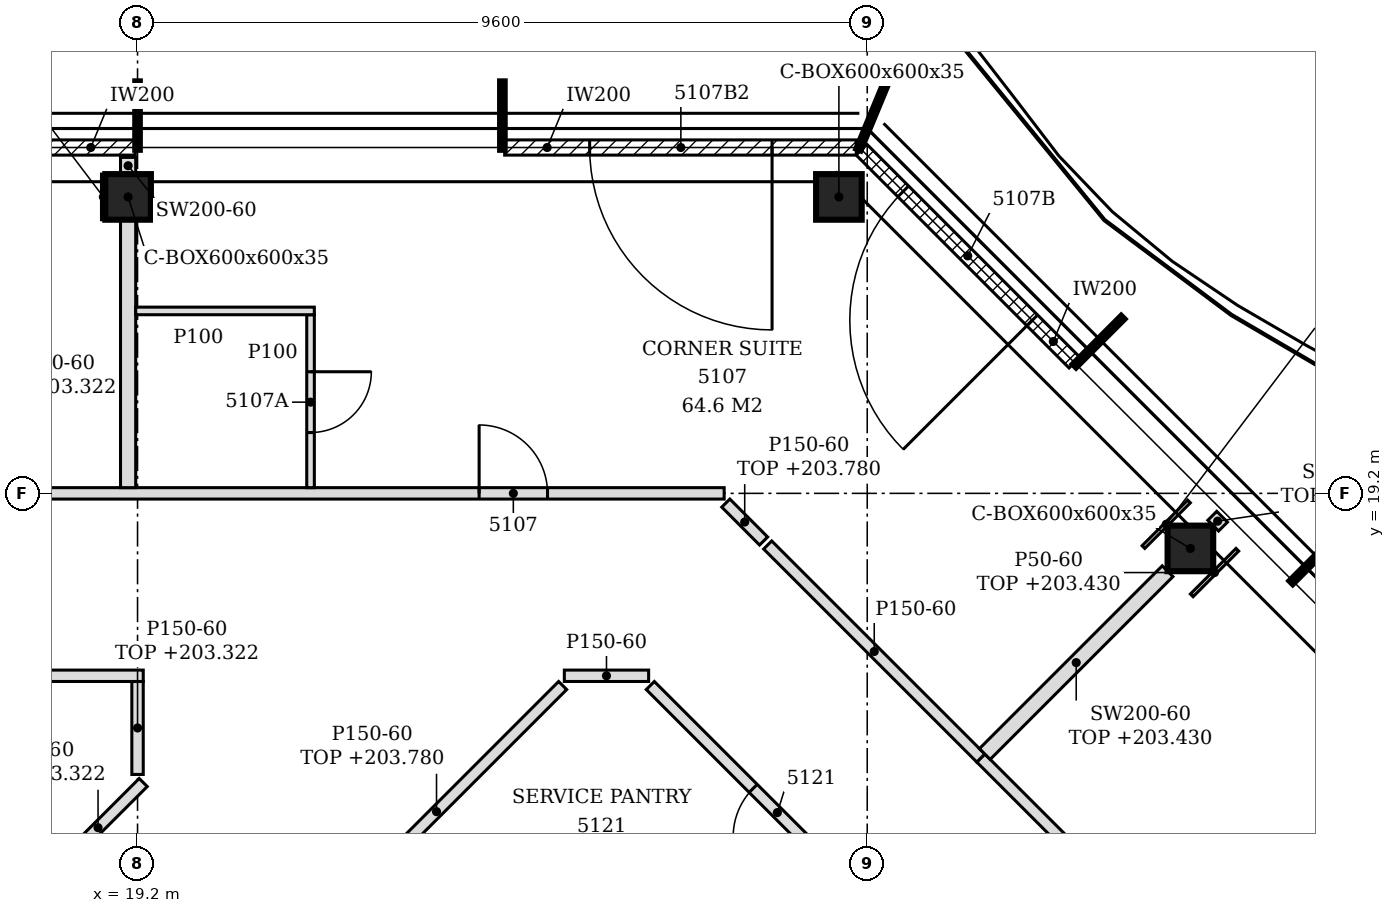
"""IFC4 building model, lengths in metres.
Left out: names, types, materials, properties, quantities, classifications, styles, units other than length and angle.
Written with IfcOpenShell. Run it as: python <this file> out.ifc"""

import sys

from ifc_helpers import new_model, si_unit, direction, frame, frame_2d, origin, origin_2d, place, context, subcontext, project, spatial, polyline, rectangle, hollow_rectangle, outline, extrude, clip, halfspace, element, fill, save


model = new_model("IFC4")
c1 = context("Model", 3, precision=1e-05, world=origin(), true_north=direction((0.0, 1.0)))
c2 = subcontext(c1, "Body", "Model", "MODEL_VIEW")
j1 = project(units=[si_unit("LENGTHUNIT", "METRE"), si_unit("PLANEANGLEUNIT", "RADIAN")], contexts=[c1])
p1 = place(None, origin())
s1 = spatial("IfcSite", under=j1, at=p1, CompositionType="ELEMENT")
p2 = place(p1, origin())
s2 = spatial("IfcBuilding", under=s1, at=p2, CompositionType="ELEMENT")
p3 = place(p2, frame((0.0, 0.0, 201.0)))
s3 = spatial("IfcBuildingStorey", under=s2, at=p3, CompositionType="ELEMENT", Elevation=201.0)
for number, where, z_axis, x_axis in (
    (1, (33.052, 18.476, -0.15), (0.0, 0.0, 1.0), (1.0, 0.0, 0.0)),
    (2, (28.427, 23.1, -0.15), (0.0, 0.0, 1.0), (1.0, 0.0, 0.0)),
    (3, (19.076, 23.1, -0.15), (0.0, 0.0, 1.0), (1.0, 0.0, 0.0)),
):
    element("IfcColumn", number, at=place(p3, frame(where, z_axis=z_axis, x_axis=x_axis)), inside=s3, PredefinedType="COLUMN", context=c2, shape_type="Clipping", body=[
        clip(clip(extrude(hollow_rectangle(XDim=0.6, YDim=0.6, WallThickness=0.035, at=origin_2d()), origin(), (0.0, 0.0, 1.0), 3.5), halfspace(frame((0.0, 0.0, 0.011), z_axis=(0.0, 0.0, 1.0), x_axis=(1.0, 0.0, 0.0)), True)), halfspace(frame((0.0, 0.0, 3.095), z_axis=(0.0, 0.0, 1.0), x_axis=(1.0, 0.0, 0.0)), False)),
    ])
p4 = place(p3, frame((31.526, 20.92, 0.0), z_axis=(0.0, 0.0, 1.0), x_axis=(-0.707106781187, 0.707106781187, 0.0)))
e4 = element("IfcWall", 4, at=p4, inside=s3, PredefinedType="NOTDEFINED", context=c2, shape_type="SweptSolid", body=[
    extrude(rectangle(XDim=3.962, YDim=0.2, at=frame_2d((1.981, 0.0))), origin(), (0.0, 0.0, 1.0), 3.35),
])
p5 = place(p4, frame((0.786, 0.0, 0.0)))
e5 = element("IfcOpeningElement", 5, at=p5, cuts=e4, PredefinedType="OPENING", context=c2, shape_type="SweptSolid", body=[
    extrude(rectangle(XDim=2.4, YDim=2.4, at=frame_2d((1.2, 1.2))), frame((0.0, 0.11, 0.0), z_axis=(0.0, -1.0, 0.0), x_axis=(1.0, 0.0, 0.0)), (0.0, 0.0, 1.0), 0.22),
])
p6 = place(p3, frame((28.656, 23.75, 0.0), z_axis=(0.0, 0.0, 1.0), x_axis=(-1.0, 0.0, 0.0)))
e6 = element("IfcWall", 6, at=p6, inside=s3, PredefinedType="NOTDEFINED", context=c2, shape_type="SweptSolid", body=[
    extrude(rectangle(XDim=4.626, YDim=0.2, at=frame_2d((2.313, 0.0))), origin(), (0.0, 0.0, 1.0), 3.35),
])
p7 = place(p6, frame((1.108, 0.0, 0.0)))
e7 = element("IfcOpeningElement", 7, at=p7, cuts=e6, PredefinedType="OPENING", context=c2, shape_type="SweptSolid", body=[
    extrude(rectangle(XDim=2.4, YDim=2.4, at=frame_2d((1.2, 1.2))), frame((0.0, 0.11, 0.0), z_axis=(0.0, -1.0, 0.0), x_axis=(1.0, 0.0, 0.0)), (0.0, 0.0, 1.0), 0.22),
])
p8 = place(p3, frame((19.17, 23.75, 0.0), z_axis=(0.0, 0.0, 1.0), x_axis=(-1.0, 0.0, 0.0)))
e8 = element("IfcWall", 8, at=p8, inside=s3, PredefinedType="NOTDEFINED", context=c2, shape_type="SweptSolid", body=[
    extrude(rectangle(XDim=4.74, YDim=0.2, at=frame_2d((2.37, 0.0))), origin(), (0.0, 0.0, 1.0), 3.35),
])
p9 = place(p8, frame((1.17, 0.0, 0.0)))
e9 = element("IfcOpeningElement", 9, at=p9, cuts=e8, PredefinedType="OPENING", context=c2, shape_type="SweptSolid", body=[
    extrude(rectangle(XDim=2.4, YDim=2.4, at=frame_2d((1.2, 1.2))), frame((0.0, 0.11, 0.0), z_axis=(0.0, -1.0, 0.0), x_axis=(1.0, 0.0, 0.0)), (0.0, 0.0, 1.0), 0.22),
])
p10 = place(p3, frame((35.872, 6.746, 0.0), z_axis=(0.0, 0.0, 1.0), x_axis=(-0.707106781187, 0.707106781187, 0.0)))
e10 = element("IfcWall", 10, at=p10, inside=s3, PredefinedType="PARTITIONING", context=c2, shape_type="SweptSolid", body=[
    extrude(rectangle(XDim=14.038, YDim=0.15, at=frame_2d((7.019, 0.0))), origin(), (0.0, 0.0, 1.0), 2.73),
])
p11 = place(p10, frame((2.763, 0.0, 0.0)))
e11 = element("IfcOpeningElement", 11, at=p11, cuts=e10, PredefinedType="OPENING", context=c2, shape_type="SweptSolid", body=[
    extrude(rectangle(XDim=0.9, YDim=2.1, at=frame_2d((0.45, 1.05))), frame((0.0, 0.085, 0.0), z_axis=(0.0, -1.0, 0.0), x_axis=(1.0, 0.0, 0.0)), (0.0, 0.0, 1.0), 0.17),
])
p12 = place(p10, frame((11.223, 0.0, 0.0)))
e12 = element("IfcOpeningElement", 12, at=p12, cuts=e10, PredefinedType="OPENING", context=c2, shape_type="SweptSolid", body=[
    extrude(rectangle(XDim=0.9, YDim=2.1, at=frame_2d((0.45, 1.05))), frame((0.0, 0.085, 0.0), z_axis=(0.0, -1.0, 0.0), x_axis=(1.0, 0.0, 0.0)), (0.0, 0.0, 1.0), 0.17),
])
p13 = place(p3, frame((38.272, 7.74, 0.0), z_axis=(0.0, 0.0, 1.0), x_axis=(-0.707106781187, 0.707106781187, 0.0)))
e13 = element("IfcWall", 13, at=p13, inside=s3, PredefinedType="PARTITIONING", context=c2, shape_type="SweptSolid", body=[
    extrude(rectangle(XDim=11.283, YDim=0.15, at=frame_2d((5.641, 0.0))), origin(), (0.0, 0.0, 1.0), 2.73),
])
p14 = place(p13, frame((7.562, 0.0, 0.0)))
e14 = element("IfcOpeningElement", 14, at=p14, cuts=e13, PredefinedType="OPENING", context=c2, shape_type="SweptSolid", body=[
    extrude(rectangle(XDim=0.9, YDim=2.1, at=frame_2d((0.45, 1.05))), frame((0.0, 0.085, 0.0), z_axis=(0.0, -1.0, 0.0), x_axis=(1.0, 0.0, 0.0)), (0.0, 0.0, 1.0), 0.17),
])
p15 = place(p3, frame((21.474, 13.353, 0.0), z_axis=(0.0, 0.0, 1.0), x_axis=(0.707080773618, 0.707132787799, 0.0)))
e15 = element("IfcWall", 15, at=p15, inside=s3, PredefinedType="PARTITIONING", context=c2, shape_type="SweptSolid", body=[
    extrude(rectangle(XDim=4.694, YDim=0.15, at=frame_2d((2.347, 0.0))), origin(), (0.0, 0.0, 1.0), 2.78),
])
p16 = place(p3, frame((18.086, 14.208, 0.0), z_axis=(0.0, 0.0, 1.0), x_axis=(0.70739723372, 0.706816209298, 0.0)))
e16 = element("IfcWall", 16, at=p16, inside=s3, PredefinedType="PARTITIONING", context=c2, shape_type="SweptSolid", body=[
    extrude(rectangle(XDim=1.681, YDim=0.15, at=frame_2d((0.84, 0.0))), origin(), (0.0, 0.0, 1.0), 2.322),
])
p17 = place(p3, frame((19.2, 15.502, 0.0), z_axis=(0.0, 0.0, 1.0), x_axis=(0.0, 1.0, 0.0)))
e17 = element("IfcWall", 17, at=p17, inside=s3, PredefinedType="PARTITIONING", context=c2, shape_type="SweptSolid", body=[
    extrude(rectangle(XDim=1.223, YDim=0.15, at=frame_2d((0.612, 0.0))), origin(), (0.0, 0.0, 1.0), 2.322),
])
p18 = place(p3, frame((30.294, 15.718, 0.0), z_axis=(0.0, 0.0, 1.0), x_axis=(-0.707229938335, 0.706983602584, 0.0)))
e18 = element("IfcWall", 18, at=p18, inside=s3, PredefinedType="PARTITIONING", context=c2, shape_type="SweptSolid", body=[
    extrude(rectangle(XDim=3.964, YDim=0.15, at=frame_2d((1.982, 0.0))), origin(), (0.0, 0.0, 1.0), 3.35),
])
p19 = place(p3, frame((30.347, 15.771, 0.0), z_axis=(0.0, 0.0, 1.0), x_axis=(0.707142675843, 0.707070884708, 0.0)))
e19 = element("IfcWall", 19, at=p19, inside=s3, PredefinedType="PARTITIONING", context=c2, shape_type="SweptSolid", body=[
    extrude(rectangle(XDim=3.401, YDim=0.2, at=frame_2d((1.7, 0.0))), origin(), (0.0, 0.0, 1.0), 2.43),
])
p20 = place(p3, frame((7.125, 16.8, 0.0), z_axis=(0.0, 0.0, 1.0), x_axis=(1.0, 0.0, 0.0)))
e20 = element("IfcWall", 20, at=p20, inside=s3, PredefinedType="PARTITIONING", context=c2, shape_type="SweptSolid", body=[
    extrude(outline(polyline([(0.0, 0.0), (12.15, 0.0), (12.15, 2.322), (11.924, 2.322), (11.922, 3.35), (0.225, 3.35), (0.223, 2.83), (0.0, 2.83), (0.0, 0.0)])), frame((0.0, 0.075, 0.0), z_axis=(0.0, -1.0, 0.0), x_axis=(1.0, 0.0, 0.0)), (0.0, 0.0, 1.0), 0.15),
])
p21 = place(p3, frame((24.815, 16.8, 0.0), z_axis=(0.0, 0.0, 1.0), x_axis=(1.0, 0.0, 0.0)))
e21 = element("IfcWall", 21, at=p21, inside=s3, PredefinedType="PARTITIONING", context=c2, shape_type="SweptSolid", body=[
    extrude(rectangle(XDim=1.109, YDim=0.15, at=frame_2d((0.555, 0.0))), origin(), (0.0, 0.0, 1.0), 3.35),
])
p22 = place(p3, frame((27.437, 18.573, 0.0), z_axis=(0.0, 0.0, 1.0), x_axis=(-0.705718940673, 0.708491903112, 0.0)))
e22 = element("IfcWall", 22, at=p22, inside=s3, PredefinedType="PARTITIONING", context=c2, shape_type="SweptSolid", body=[
    extrude(rectangle(XDim=0.704, YDim=0.15, at=frame_2d((0.352, 0.0))), origin(), (0.0, 0.0, 1.0), 2.78),
])
p23 = place(p3, frame((33.352, 18.776, 0.0), z_axis=(0.0, 0.0, 1.0), x_axis=(0.707106781187, 0.707106781187, 0.0)))
e23 = element("IfcWall", 23, at=p23, inside=s3, PredefinedType="PARTITIONING", context=c2, shape_type="SweptSolid", body=[
    extrude(rectangle(XDim=0.166, YDim=0.2, at=frame_2d((0.083, 0.0))), origin(), (0.0, 0.0, 1.0), 2.43),
])
p24 = place(p3, frame((-4.326, 19.2, 0.0), z_axis=(0.0, 0.0, 1.0), x_axis=(1.0, 0.0, 0.0)))
e24 = element("IfcWall", 24, at=p24, inside=s3, PredefinedType="PARTITIONING", context=c2, shape_type="SweptSolid", body=[
    extrude(outline(polyline([(0.0, 0.0), (31.244, 0.0), (31.244, 2.552), (23.677, 2.552), (23.675, 2.322), (23.375, 2.322), (23.373, 2.552), (1.51, 2.552), (1.508, 2.43), (0.087, 2.43), (0.085, 2.552), (0.0, 2.552), (0.0, 0.0)])), frame((0.0, 0.075, 0.0), z_axis=(0.0, -1.0, 0.0), x_axis=(1.0, 0.0, 0.0)), (0.0, 0.0, 1.0), 0.15),
])
p25 = place(p24, frame((28.02, 0.0, 0.0)))
e25 = element("IfcOpeningElement", 25, at=p25, cuts=e24, PredefinedType="OPENING", context=c2, shape_type="SweptSolid", body=[
    extrude(rectangle(XDim=0.9, YDim=2.1, at=frame_2d((0.45, 1.05))), frame((0.0, 0.085, 0.0), z_axis=(0.0, -1.0, 0.0), x_axis=(1.0, 0.0, 0.0)), (0.0, 0.0, 1.0), 0.17),
])
p26 = place(p24, frame((19.776, 0.0, 0.0)))
e26 = element("IfcOpeningElement", 26, at=p26, cuts=e24, PredefinedType="OPENING", context=c2, shape_type="SweptSolid", body=[
    extrude(rectangle(XDim=0.9, YDim=2.1, at=frame_2d((0.45, 1.05))), frame((0.0, 0.085, 0.0), z_axis=(0.0, -1.0, 0.0), x_axis=(1.0, 0.0, 0.0)), (0.0, 0.0, 1.0), 0.17),
])
p27 = place(p24, frame((5.138, 0.0, 0.0)))
e27 = element("IfcOpeningElement", 27, at=p27, cuts=e24, PredefinedType="OPENING", context=c2, shape_type="SweptSolid", body=[
    extrude(rectangle(XDim=0.9, YDim=2.1, at=frame_2d((0.45, 1.05))), frame((0.0, 0.085, 0.0), z_axis=(0.0, -1.0, 0.0), x_axis=(1.0, 0.0, 0.0)), (0.0, 0.0, 1.0), 0.17),
])
p28 = place(p3, frame((19.076, 19.275, 0.0), z_axis=(0.0, 0.0, 1.0), x_axis=(0.0, 1.0, 0.0)))
e28 = element("IfcWall", 28, at=p28, inside=s3, PredefinedType="PARTITIONING", context=c2, shape_type="SweptSolid", body=[
    extrude(rectangle(XDim=3.525, YDim=0.2, at=frame_2d((1.763, 0.0))), origin(), (0.0, 0.0, 1.0), 2.322),
])
p29 = place(p3, frame((21.476, 19.275, 0.0), z_axis=(0.0, 0.0, 1.0), x_axis=(0.0, 1.0, 0.0)))
e29 = element("IfcWall", 29, at=p29, inside=s3, PredefinedType="PARTITIONING", context=c2, shape_type="SweptSolid", body=[
    extrude(outline(polyline([(0.0, 0.0), (2.275, 0.0), (2.275, 3.35), (0.03, 3.35), (0.028, 2.78), (0.0, 2.78), (0.0, 0.0)])), frame((0.0, 0.05, 0.0), z_axis=(0.0, -1.0, 0.0), x_axis=(1.0, 0.0, 0.0)), (0.0, 0.0, 1.0), 0.1),
])
p30 = place(p29, frame((0.725, 0.0, 0.0)))
e30 = element("IfcOpeningElement", 30, at=p30, cuts=e29, PredefinedType="OPENING", context=c2, shape_type="SweptSolid", body=[
    extrude(rectangle(XDim=0.8, YDim=2.1, at=frame_2d((0.4, 1.05))), frame((0.0, 0.06, 0.0), z_axis=(0.0, -1.0, 0.0), x_axis=(1.0, 0.0, 0.0)), (0.0, 0.0, 1.0), 0.12),
])
p31 = place(p3, frame((19.176, 21.6, 0.0), z_axis=(0.0, 0.0, 1.0), x_axis=(1.0, 0.0, 0.0)))
e31 = element("IfcWall", 31, at=p31, inside=s3, PredefinedType="PARTITIONING", context=c2, shape_type="SweptSolid", body=[
    extrude(outline(polyline([(0.0, 0.0), (2.35, 0.0), (2.35, 3.35), (0.175, 3.35), (0.173, 2.322), (0.0, 2.322), (0.0, 0.0)])), frame((0.0, 0.05, 0.0), z_axis=(0.0, -1.0, 0.0), x_axis=(1.0, 0.0, 0.0)), (0.0, 0.0, 1.0), 0.1),
])
p32 = place(p3, frame((19.076, 23.4, 0.0), z_axis=(0.0, 0.0, 1.0), x_axis=(0.0, 1.0, 0.0)))
e32 = element("IfcWall", 32, at=p32, inside=s3, PredefinedType="PARTITIONING", context=c2, shape_type="SweptSolid", body=[
    extrude(outline(polyline([(0.0, 0.0), (0.22, 0.0), (0.22, 3.35), (0.15, 3.35), (0.148, 2.43), (0.0, 2.43), (0.0, 0.0)])), frame((0.0, 0.1, 0.0), z_axis=(0.0, -1.0, 0.0), x_axis=(1.0, 0.0, 0.0)), (0.0, 0.0, 1.0), 0.2),
])
p33 = place(p3, frame((32.434, 18.493, 0.0), z_axis=(0.0, 0.0, 1.0), x_axis=(0.706962899457, 0.707250633645, 0.0)))
e33 = element("IfcWall", 33, at=p33, inside=s3, PredefinedType="PARTITIONING", context=c2, shape_type="SweptSolid", body=[
    extrude(rectangle(XDim=0.848, YDim=0.05, at=frame_2d((0.424, 0.0))), origin(), (0.0, 0.0, 1.0), 2.43),
])
p34 = place(p3, frame((33.069, 17.858, 0.0), z_axis=(0.0, 0.0, 1.0), x_axis=(0.707106781187, 0.707106781187, 0.0)))
e34 = element("IfcWall", 34, at=p34, inside=s3, PredefinedType="PARTITIONING", context=c2, shape_type="SweptSolid", body=[
    extrude(rectangle(XDim=0.849, YDim=0.05, at=frame_2d((0.424, 0.0))), origin(), (0.0, 0.0, 1.0), 2.43),
])
p35 = place(p3, frame((18.751, 22.8, 0.0), z_axis=(0.0, 0.0, 1.0), x_axis=(0.0, 1.0, 0.0)))
e35 = element("IfcWall", 35, at=p35, inside=s3, PredefinedType="PARTITIONING", context=c2, shape_type="SweptSolid", body=[
    extrude(rectangle(XDim=0.6, YDim=0.05, at=frame_2d((0.3, 0.0))), origin(), (0.0, 0.0, 1.0), 2.43),
])
p36 = place(p5, origin())
e36 = element("IfcDoor", 36, at=p36, inside=s3, OperationType="SINGLE_SWING_LEFT", PredefinedType="DOOR", context=c2, shape_type="SweptSolid", body=[
    extrude(rectangle(XDim=2.4, YDim=2.4, at=frame_2d((1.2, 1.2))), frame((0.0, 0.025, 0.0), z_axis=(0.0, -1.0, 0.0), x_axis=(1.0, 0.0, 0.0)), (0.0, 0.0, 1.0), 0.05),
])
fill(e5, e36)
p37 = place(p7, origin())
e37 = element("IfcDoor", 37, at=p37, inside=s3, OperationType="SINGLE_SWING_LEFT", PredefinedType="DOOR", context=c2, shape_type="SweptSolid", body=[
    extrude(rectangle(XDim=2.4, YDim=2.4, at=frame_2d((1.2, 1.2))), frame((0.0, 0.025, 0.0), z_axis=(0.0, -1.0, 0.0), x_axis=(1.0, 0.0, 0.0)), (0.0, 0.0, 1.0), 0.05),
])
fill(e7, e37)
p38 = place(p25, origin())
e38 = element("IfcDoor", 38, at=p38, inside=s3, OperationType="SINGLE_SWING_LEFT", PredefinedType="DOOR", context=c2, shape_type="SweptSolid", body=[
    extrude(rectangle(XDim=0.9, YDim=2.1, at=frame_2d((0.45, 1.05))), frame((0.0, 0.025, 0.0), z_axis=(0.0, -1.0, 0.0), x_axis=(1.0, 0.0, 0.0)), (0.0, 0.0, 1.0), 0.05),
])
fill(e25, e38)
p39 = place(p30, frame((0.8, 0.0, 0.0), z_axis=(0.0, 0.0, 1.0), x_axis=(-1.0, 0.0, 0.0)))
e39 = element("IfcDoor", 39, at=p39, inside=s3, OperationType="SINGLE_SWING_LEFT", PredefinedType="DOOR", context=c2, shape_type="SweptSolid", body=[
    extrude(rectangle(XDim=0.8, YDim=2.1, at=frame_2d((0.4, 1.05))), frame((0.0, 0.025, 0.0), z_axis=(0.0, -1.0, 0.0), x_axis=(1.0, 0.0, 0.0)), (0.0, 0.0, 1.0), 0.05),
])
fill(e30, e39)
p40 = place(p12, origin())
e40 = element("IfcDoor", 40, at=p40, inside=s3, OperationType="SINGLE_SWING_LEFT", PredefinedType="DOOR", context=c2, shape_type="SweptSolid", body=[
    extrude(rectangle(XDim=0.9, YDim=2.1, at=frame_2d((0.45, 1.05))), frame((0.0, 0.025, 0.0), z_axis=(0.0, -1.0, 0.0), x_axis=(1.0, 0.0, 0.0)), (0.0, 0.0, 1.0), 0.05),
])
fill(e12, e40)
save(model, sys.argv[1])
